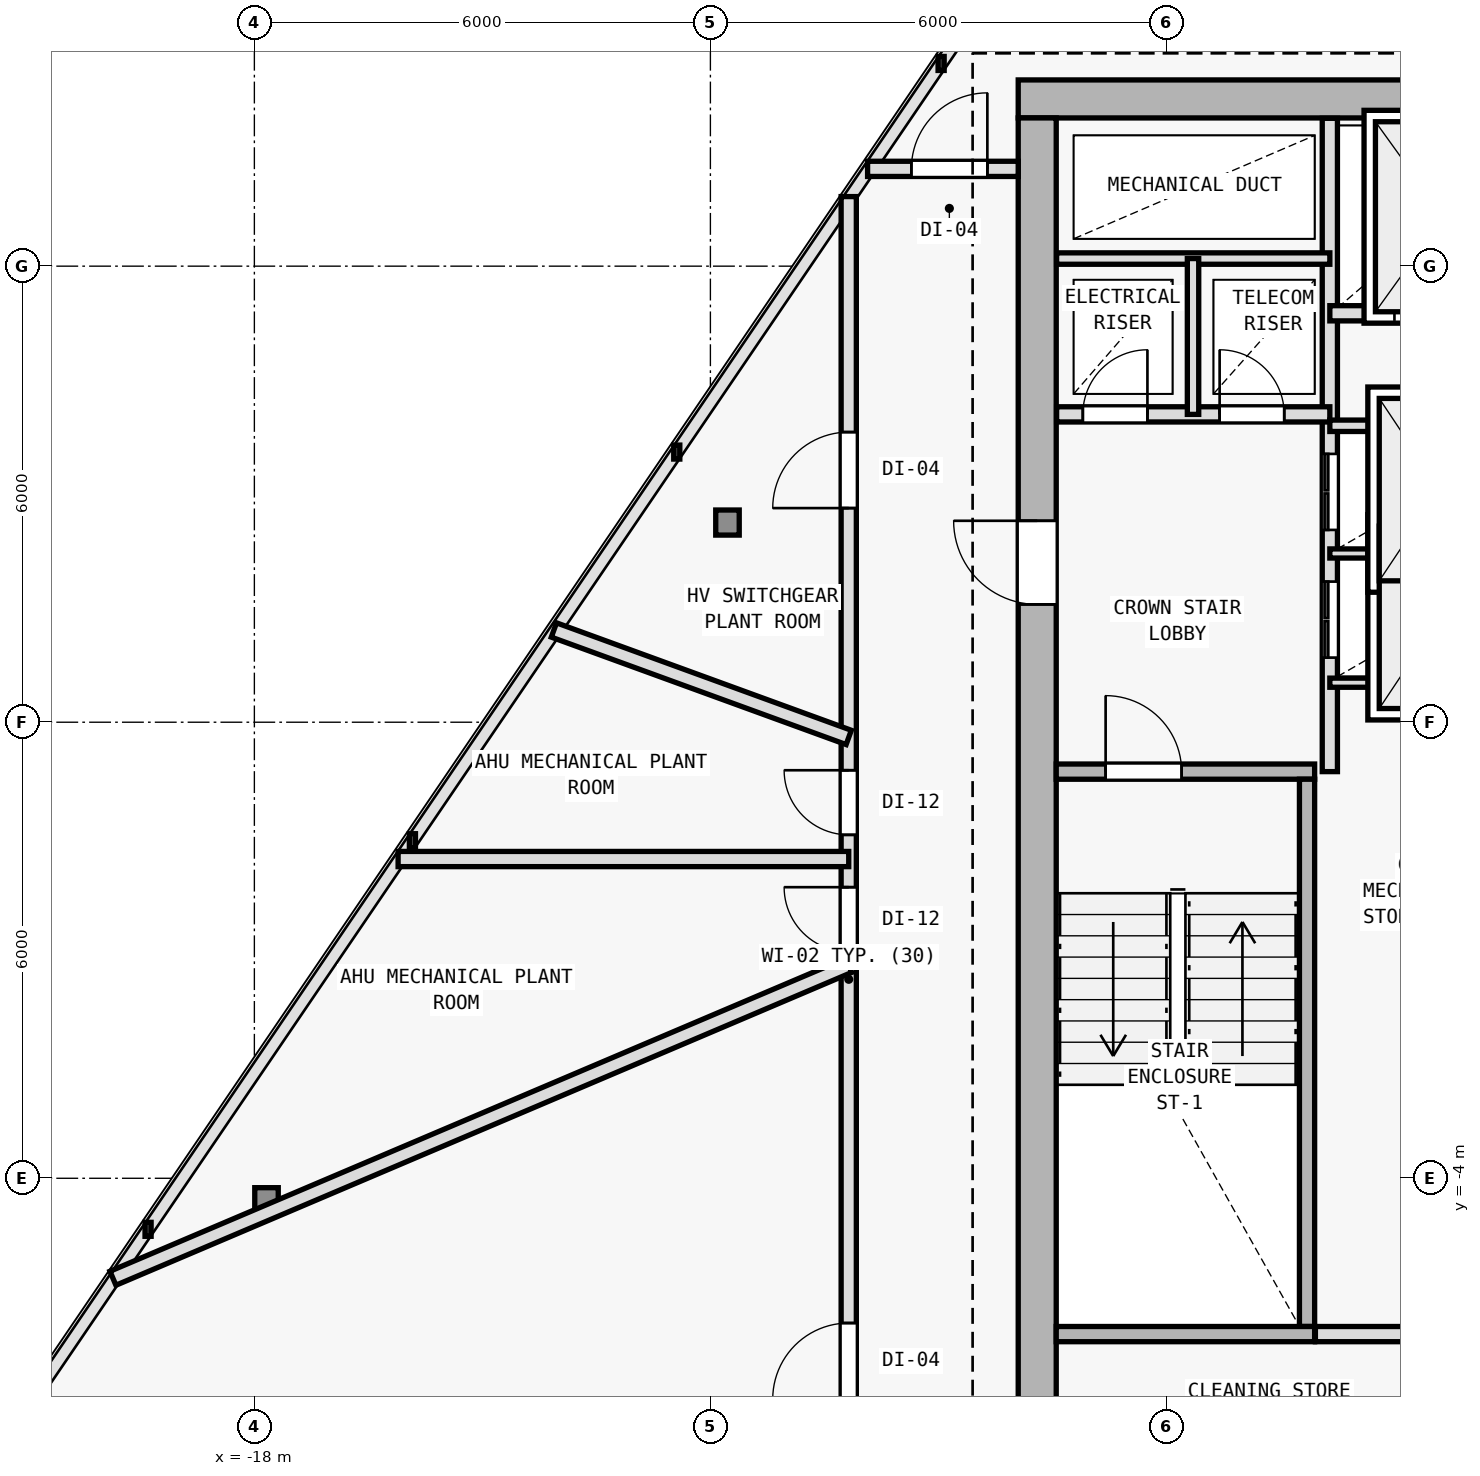
"""IFC4 building model, lengths in metres.
Left out: names, types, materials, properties, quantities, classifications, styles, units other than length and angle.
Written with IfcOpenShell. Run it as: python <this file> out.ifc"""

import sys

from ifc_helpers import new_model, si_unit, direction, frame, frame_2d, origin, origin_2d, place, context, subcontext, project, spatial, rectangle, i_section, extrude, element, fill, save


model = new_model("IFC4")
c1 = context("Model", 3, precision=1e-05, world=origin(), true_north=direction((0.0, 1.0)))
c2 = subcontext(c1, "Body", "Model", "MODEL_VIEW")
j1 = project(units=[si_unit("LENGTHUNIT", "METRE"), si_unit("PLANEANGLEUNIT", "RADIAN")], contexts=[c1])
p1 = place(None, origin())
s1 = spatial("IfcSite", under=j1, at=p1, CompositionType="ELEMENT")
p2 = place(p1, origin())
s2 = spatial("IfcBuilding", under=s1, at=p2, CompositionType="ELEMENT")
p3 = place(p2, frame((0.0, 0.0, 308.4)))
s3 = spatial("IfcBuildingStorey", under=s2, at=p3, CompositionType="ELEMENT", Elevation=308.4)
for number, where, z_axis, x_axis in (
    (1, (-7.7, 10.2, 0.0), (0.0, 0.0, 1.0), (1.0, 0.0, 0.0)),
    (2, (-7.7, 2.0, 0.0), (0.0, 0.0, 1.0), (1.0, 0.0, 0.0)),
):
    element("IfcColumn", number, at=place(p3, frame(where, z_axis=z_axis, x_axis=x_axis)), inside=s3, PredefinedType="COLUMN", context=c2, shape_type="SweptSolid", body=[
        extrude(i_section(OverallWidth=0.374, OverallDepth=0.372, WebThickness=0.012, FlangeThickness=0.02, FilletRadius=0.015, at=origin_2d()), origin(), (0.0, 0.0, 1.0), 3.6),
    ])
for number, where, z_axis, x_axis in (
    (3, (-17.84, -4.289, 0.0), (0.0, 0.0, 1.0), (1.0, 0.0, 0.0)),
    (4, (-11.775, 4.627, 0.0), (0.0, 0.0, 1.0), (1.0, 0.0, 0.0)),
):
    element("IfcColumn", number, at=place(p3, frame(where, z_axis=z_axis, x_axis=x_axis)), inside=s3, PredefinedType="COLUMN", context=c2, shape_type="SweptSolid", body=[
        extrude(i_section(OverallWidth=0.309, OverallDepth=0.33, WebThickness=0.011, FlangeThickness=0.019, FilletRadius=0.027, at=origin_2d()), origin(), (0.0, 0.0, 1.0), 3.6),
    ])
p4 = place(p3, frame((7.95, 10.2, 0.0), z_axis=(0.0, 0.0, 1.0), x_axis=(-1.0, 0.0, 0.0)))
e5 = element("IfcWall", 5, at=p4, inside=s3, PredefinedType="SHEAR", context=c2, shape_type="SweptSolid", body=[
    extrude(rectangle(XDim=15.9, YDim=0.5, at=frame_2d((7.95, 0.0))), origin(), (0.0, 0.0, 1.0), 3.34),
])
p5 = place(p4, frame((4.4, 0.0, 0.0)))
e6 = element("IfcOpeningElement", 6, at=p5, cuts=e5, PredefinedType="OPENING", context=c2, shape_type="SweptSolid", body=[
    extrude(rectangle(XDim=1.1, YDim=2.15, at=frame_2d((0.55, 1.075))), frame((0.0, 0.26, 0.0), z_axis=(0.0, -1.0, 0.0), x_axis=(1.0, 0.0, 0.0)), (0.0, 0.0, 1.0), 0.52),
])
p6 = place(p3, frame((-7.7, -9.15, 0.0), z_axis=(0.0, 0.0, 1.0), x_axis=(0.0, 1.0, 0.0)))
e7 = element("IfcWall", 7, at=p6, inside=s3, PredefinedType="SHEAR", context=c2, shape_type="SweptSolid", body=[
    extrude(rectangle(XDim=19.1, YDim=0.5, at=frame_2d((9.55, 0.0))), origin(), (0.0, 0.0, 1.0), 3.34),
])
p7 = place(p6, frame((12.7, 0.0, 0.0)))
e8 = element("IfcOpeningElement", 8, at=p7, cuts=e7, PredefinedType="OPENING", context=c2, shape_type="SweptSolid", body=[
    extrude(rectangle(XDim=1.1, YDim=2.15, at=frame_2d((0.55, 1.075))), frame((0.0, 0.26, 0.0), z_axis=(0.0, -1.0, 0.0), x_axis=(1.0, 0.0, 0.0)), (0.0, 0.0, 1.0), 0.52),
])
p8 = place(p3, frame((-7.45, 1.35, 0.0), z_axis=(0.0, 0.0, 1.0), x_axis=(1.0, 0.0, 0.0)))
e9 = element("IfcWall", 9, at=p8, inside=s3, PredefinedType="SOLIDWALL", context=c2, shape_type="SweptSolid", body=[
    extrude(rectangle(XDim=3.4, YDim=0.2, at=frame_2d((1.7, 0.0))), origin(), (0.0, 0.0, 1.0), 3.34),
])
p9 = place(p8, frame((0.65, 0.0, 0.0)))
e10 = element("IfcOpeningElement", 10, at=p9, cuts=e9, PredefinedType="OPENING", context=c2, shape_type="SweptSolid", body=[
    extrude(rectangle(XDim=1.0, YDim=2.15, at=frame_2d((0.5, 1.075))), frame((0.0, 0.11, 0.0), z_axis=(0.0, -1.0, 0.0), x_axis=(1.0, 0.0, 0.0)), (0.0, 0.0, 1.0), 0.22),
])
p10 = place(p3, frame((-4.15, -5.95, 0.0), z_axis=(0.0, 0.0, 1.0), x_axis=(0.0, 1.0, 0.0)))
e11 = element("IfcWall", 11, at=p10, inside=s3, PredefinedType="SOLIDWALL", context=c2, shape_type="SweptSolid", body=[
    extrude(rectangle(XDim=7.2, YDim=0.2, at=frame_2d((3.6, 0.0))), origin(), (0.0, 0.0, 1.0), 3.34),
])
p11 = place(p3, frame((-3.85, 1.35, 0.0), z_axis=(0.0, 0.0, 1.0), x_axis=(0.0, 1.0, 0.0)))
e12 = element("IfcWall", 12, at=p11, inside=s3, PredefinedType="SOLIDWALL", context=c2, shape_type="SweptSolid", body=[
    extrude(rectangle(XDim=8.595, YDim=0.2, at=frame_2d((4.297, 0.0))), origin(), (0.0, 0.0, 1.0), 3.34),
])
p12 = place(p11, frame((1.5, 0.0, 0.0)))
e13 = element("IfcOpeningElement", 13, at=p12, cuts=e12, PredefinedType="OPENING", context=c2, shape_type="SweptSolid", body=[
    extrude(rectangle(XDim=1.0, YDim=2.15, at=frame_2d((0.5, 1.075))), frame((0.0, 0.11, 0.0), z_axis=(0.0, -1.0, 0.0), x_axis=(1.0, 0.0, 0.0)), (0.0, 0.0, 1.0), 0.22),
])
p13 = place(p11, frame((3.18, 0.0, 0.0)))
e14 = element("IfcOpeningElement", 14, at=p13, cuts=e12, PredefinedType="OPENING", context=c2, shape_type="SweptSolid", body=[
    extrude(rectangle(XDim=1.0, YDim=2.15, at=frame_2d((0.5, 1.075))), frame((0.0, 0.11, 0.0), z_axis=(0.0, -1.0, 0.0), x_axis=(1.0, 0.0, 0.0)), (0.0, 0.0, 1.0), 0.22),
])
p14 = place(p3, frame((-7.445, 6.05, 0.0), z_axis=(0.0, 0.0, 1.0), x_axis=(1.0, 0.0, 0.0)))
e15 = element("IfcWall", 15, at=p14, inside=s3, PredefinedType="SOLIDWALL", context=c2, shape_type="SweptSolid", body=[
    extrude(rectangle(XDim=3.595, YDim=0.2, at=frame_2d((1.797, 0.0))), origin(), (0.0, 0.0, 1.0), 3.34),
])
p15 = place(p14, frame((0.345, 0.0, 0.0)))
e16 = element("IfcOpeningElement", 16, at=p15, cuts=e15, PredefinedType="OPENING", context=c2, shape_type="SweptSolid", body=[
    extrude(rectangle(XDim=0.85, YDim=2.1, at=frame_2d((0.425, 1.05))), frame((0.0, 0.11, 0.0), z_axis=(0.0, -1.0, 0.0), x_axis=(1.0, 0.0, 0.0)), (0.0, 0.0, 1.0), 0.22),
])
p16 = place(p14, frame((2.145, 0.0, 0.0)))
e17 = element("IfcOpeningElement", 17, at=p16, cuts=e15, PredefinedType="OPENING", context=c2, shape_type="SweptSolid", body=[
    extrude(rectangle(XDim=0.85, YDim=2.1, at=frame_2d((0.425, 1.05))), frame((0.0, 0.11, 0.0), z_axis=(0.0, -1.0, 0.0), x_axis=(1.0, 0.0, 0.0)), (0.0, 0.0, 1.0), 0.22),
])
p17 = place(p3, frame((-7.445, 8.1, 0.0), z_axis=(0.0, 0.0, 1.0), x_axis=(1.0, 0.0, 0.0)))
e18 = element("IfcWall", 18, at=p17, inside=s3, PredefinedType="PARTITIONING", context=c2, shape_type="SweptSolid", body=[
    extrude(rectangle(XDim=3.595, YDim=0.15, at=frame_2d((1.797, 0.0))), origin(), (0.0, 0.0, 1.0), 3.34),
])
p18 = place(p3, frame((-5.65, 6.05, 0.0), z_axis=(0.0, 0.0, 1.0), x_axis=(0.0, 1.0, 0.0)))
e19 = element("IfcWall", 19, at=p18, inside=s3, PredefinedType="PARTITIONING", context=c2, shape_type="SweptSolid", body=[
    extrude(rectangle(XDim=2.05, YDim=0.15, at=frame_2d((1.025, 0.0))), origin(), (0.0, 0.0, 1.0), 3.34),
])
for number, where, z_axis, x_axis in (
    (20, (-3.85, 2.52, 0.0), (0.0, 0.0, 1.0), (1.0, 0.0, 0.0)),
    (21, (-3.85, 4.22, 0.0), (0.0, 0.0, 1.0), (1.0, 0.0, 0.0)),
):
    element("IfcWall", number, at=place(p3, frame(where, z_axis=z_axis, x_axis=x_axis)), inside=s3, PredefinedType="PARTITIONING", context=c2, shape_type="SweptSolid", body=[
        extrude(rectangle(XDim=2.9, YDim=0.12, at=frame_2d((1.45, 0.0))), origin(), (0.0, 0.0, 1.0), 3.34),
    ])
p19 = place(p3, frame((-3.85, 5.9, 0.0), z_axis=(0.0, 0.0, 1.0), x_axis=(1.0, 0.0, 0.0)))
e22 = element("IfcWall", 22, at=p19, inside=s3, PredefinedType="PARTITIONING", context=c2, shape_type="SweptSolid", body=[
    extrude(rectangle(XDim=2.9, YDim=0.15, at=frame_2d((1.45, 0.0))), origin(), (0.0, 0.0, 1.0), 3.34),
])
p20 = place(p3, frame((-3.85, 7.38, 0.0), z_axis=(0.0, 0.0, 1.0), x_axis=(1.0, 0.0, 0.0)))
e23 = element("IfcWall", 23, at=p20, inside=s3, PredefinedType="SOLIDWALL", context=c2, shape_type="SweptSolid", body=[
    extrude(rectangle(XDim=2.9, YDim=0.2, at=frame_2d((1.45, 0.0))), origin(), (0.0, 0.0, 1.0), 3.34),
])
p21 = place(p20, frame((0.85, 0.0, 0.0)))
e24 = element("IfcOpeningElement", 24, at=p21, cuts=e23, PredefinedType="OPENING", context=c2, shape_type="SweptSolid", body=[
    extrude(rectangle(XDim=1.2, YDim=2.2, at=frame_2d((0.6, 1.1))), frame((0.0, 0.11, 0.0), z_axis=(0.0, -1.0, 0.0), x_axis=(1.0, 0.0, 0.0)), (0.0, 0.0, 1.0), 0.22),
])
p22 = place(p3, frame((-7.45, -6.05, 0.0), z_axis=(0.0, 0.0, 1.0), x_axis=(1.0, 0.0, 0.0)))
e25 = element("IfcWall", 25, at=p22, inside=s3, PredefinedType="SOLIDWALL", context=c2, shape_type="SweptSolid", body=[
    extrude(rectangle(XDim=3.4, YDim=0.2, at=frame_2d((1.7, 0.0))), origin(), (0.0, 0.0, 1.0), 3.34),
])
p23 = place(p3, frame((-4.04, -6.05, 0.0), z_axis=(0.0, 0.0, 1.0), x_axis=(1.0, 0.0, 0.0)))
e26 = element("IfcWall", 26, at=p23, inside=s3, PredefinedType="SOLIDWALL", context=c2, shape_type="SweptSolid", body=[
    extrude(rectangle(XDim=2.79, YDim=0.2, at=frame_2d((1.395, 0.0))), origin(), (0.0, 0.0, 1.0), 3.34),
])
p24 = place(p3, frame((-10.18, -11.68, 0.0), z_axis=(0.0, 0.0, 1.0), x_axis=(0.0, 1.0, 0.0)))
e27 = element("IfcWall", 27, at=p24, inside=s3, PredefinedType="SOLIDWALL", context=c2, shape_type="SweptSolid", body=[
    extrude(rectangle(XDim=20.595, YDim=0.2, at=frame_2d((10.298, 0.0))), origin(), (0.0, 0.0, 1.0), 2.995),
])
p25 = place(p24, frame((10.66, 0.0, 0.0)))
e28 = element("IfcOpeningElement", 28, at=p25, cuts=e27, PredefinedType="OPENING", context=c2, shape_type="SweptSolid", body=[
    extrude(rectangle(XDim=0.85, YDim=2.1, at=frame_2d((0.425, 1.05))), frame((0.0, 0.11, 0.0), z_axis=(0.0, -1.0, 0.0), x_axis=(1.0, 0.0, 0.0)), (0.0, 0.0, 1.0), 0.22),
])
p26 = place(p24, frame((4.776, 0.0, 0.0)))
e29 = element("IfcOpeningElement", 29, at=p26, cuts=e27, PredefinedType="OPENING", context=c2, shape_type="SweptSolid", body=[
    extrude(rectangle(XDim=1.0, YDim=2.15, at=frame_2d((0.5, 1.075))), frame((0.0, 0.11, 0.0), z_axis=(0.0, -1.0, 0.0), x_axis=(1.0, 0.0, 0.0)), (0.0, 0.0, 1.0), 0.22),
])
p27 = place(p24, frame((16.497, 0.0, 0.0)))
e30 = element("IfcOpeningElement", 30, at=p27, cuts=e27, PredefinedType="OPENING", context=c2, shape_type="SweptSolid", body=[
    extrude(rectangle(XDim=1.0, YDim=2.15, at=frame_2d((0.5, 1.075))), frame((0.0, 0.11, 0.0), z_axis=(0.0, -1.0, 0.0), x_axis=(1.0, 0.0, 0.0)), (0.0, 0.0, 1.0), 0.22),
])
p28 = place(p24, frame((12.198, 0.0, 0.0)))
e31 = element("IfcOpeningElement", 31, at=p28, cuts=e27, PredefinedType="OPENING", context=c2, shape_type="SweptSolid", body=[
    extrude(rectangle(XDim=0.85, YDim=2.1, at=frame_2d((0.425, 1.05))), frame((0.0, 0.11, 0.0), z_axis=(0.0, -1.0, 0.0), x_axis=(1.0, 0.0, 0.0)), (0.0, 0.0, 1.0), 0.22),
])
p29 = place(p3, frame((-9.932, 9.28, 0.0), z_axis=(0.0, 0.0, 1.0), x_axis=(1.0, 0.0, 0.0)))
e32 = element("IfcWall", 32, at=p29, inside=s3, PredefinedType="SOLIDWALL", context=c2, shape_type="SweptSolid", body=[
    extrude(rectangle(XDim=1.982, YDim=0.2, at=frame_2d((0.991, 0.0))), origin(), (0.0, 0.0, 1.0), 3.34),
])
p30 = place(p29, frame((0.576, 0.0, 0.0)))
e33 = element("IfcOpeningElement", 33, at=p30, cuts=e32, PredefinedType="OPENING", context=c2, shape_type="SweptSolid", body=[
    extrude(rectangle(XDim=1.0, YDim=2.15, at=frame_2d((0.5, 1.075))), frame((0.0, 0.11, 0.0), z_axis=(0.0, -1.0, 0.0), x_axis=(1.0, 0.0, 0.0)), (0.0, 0.0, 1.0), 0.22),
])
p31 = place(p3, frame((-19.861, -5.315, 0.0), z_axis=(0.0, 0.0, 1.0), x_axis=(0.920301883317, 0.391208951282, 0.0)))
e34 = element("IfcWall", 34, at=p31, inside=s3, PredefinedType="SOLIDWALL", context=c2, shape_type="SweptSolid", body=[
    extrude(rectangle(XDim=10.519, YDim=0.2, at=frame_2d((5.26, 0.0))), origin(), (0.0, 0.0, 1.0), 2.995),
])
p32 = place(p3, frame((-14.059, 3.213, 0.0), z_axis=(0.0, 0.0, 1.0), x_axis=(0.939573947061, -0.342346020867, 0.0)))
e35 = element("IfcWall", 35, at=p32, inside=s3, PredefinedType="SOLIDWALL", context=c2, shape_type="SweptSolid", body=[
    extrude(rectangle(XDim=4.128, YDim=0.2, at=frame_2d((2.064, 0.0))), origin(), (0.0, 0.0, 1.0), 3.34),
])
p33 = place(p3, frame((-16.109, 0.2, 0.0), z_axis=(0.0, 0.0, 1.0), x_axis=(1.0, 0.0, 0.0)))
e36 = element("IfcWall", 36, at=p33, inside=s3, PredefinedType="SOLIDWALL", context=c2, shape_type="SweptSolid", body=[
    extrude(rectangle(XDim=5.929, YDim=0.2, at=frame_2d((2.964, 0.0))), origin(), (0.0, 0.0, 1.0), 3.34),
])
p34 = place(p7, origin())
e37 = element("IfcDoor", 37, at=p34, inside=s3, OperationType="SINGLE_SWING_RIGHT", PredefinedType="DOOR", context=c2, shape_type="SweptSolid", body=[
    extrude(rectangle(XDim=1.1, YDim=2.15, at=frame_2d((0.55, 1.075))), frame((0.0, 0.025, 0.0), z_axis=(0.0, -1.0, 0.0), x_axis=(1.0, 0.0, 0.0)), (0.0, 0.0, 1.0), 0.05),
])
fill(e8, e37)
p35 = place(p9, origin())
e38 = element("IfcDoor", 38, at=p35, inside=s3, OperationType="SINGLE_SWING_LEFT", PredefinedType="DOOR", context=c2, shape_type="SweptSolid", body=[
    extrude(rectangle(XDim=1.0, YDim=2.15, at=frame_2d((0.5, 1.075))), frame((0.0, 0.025, 0.0), z_axis=(0.0, -1.0, 0.0), x_axis=(1.0, 0.0, 0.0)), (0.0, 0.0, 1.0), 0.05),
])
fill(e10, e38)
p36 = place(p15, origin())
e39 = element("IfcDoor", 39, at=p36, inside=s3, OperationType="SINGLE_SWING_RIGHT", PredefinedType="DOOR", context=c2, shape_type="SweptSolid", body=[
    extrude(rectangle(XDim=0.85, YDim=2.1, at=frame_2d((0.425, 1.05))), frame((0.0, 0.025, 0.0), z_axis=(0.0, -1.0, 0.0), x_axis=(1.0, 0.0, 0.0)), (0.0, 0.0, 1.0), 0.05),
])
fill(e16, e39)
p37 = place(p16, origin())
e40 = element("IfcDoor", 40, at=p37, inside=s3, OperationType="SINGLE_SWING_LEFT", PredefinedType="DOOR", context=c2, shape_type="SweptSolid", body=[
    extrude(rectangle(XDim=0.85, YDim=2.1, at=frame_2d((0.425, 1.05))), frame((0.0, 0.025, 0.0), z_axis=(0.0, -1.0, 0.0), x_axis=(1.0, 0.0, 0.0)), (0.0, 0.0, 1.0), 0.05),
])
fill(e17, e40)
p38 = place(p21, origin())
e41 = element("IfcDoor", 41, at=p38, inside=s3, OperationType="DOUBLE_DOOR_SLIDING", PredefinedType="DOOR", context=c2, shape_type="SweptSolid", body=[
    extrude(rectangle(XDim=1.2, YDim=2.2, at=frame_2d((0.6, 1.1))), frame((0.0, 0.025, 0.0), z_axis=(0.0, -1.0, 0.0), x_axis=(1.0, 0.0, 0.0)), (0.0, 0.0, 1.0), 0.05),
])
fill(e24, e41)
p39 = place(p12, origin())
e42 = element("IfcDoor", 42, at=p39, inside=s3, OperationType="DOUBLE_DOOR_SLIDING", PredefinedType="DOOR", context=c2, shape_type="SweptSolid", body=[
    extrude(rectangle(XDim=1.0, YDim=2.15, at=frame_2d((0.5, 1.075))), frame((0.0, 0.025, 0.0), z_axis=(0.0, -1.0, 0.0), x_axis=(1.0, 0.0, 0.0)), (0.0, 0.0, 1.0), 0.05),
])
fill(e13, e42)
p40 = place(p13, origin())
e43 = element("IfcDoor", 43, at=p40, inside=s3, OperationType="DOUBLE_DOOR_SLIDING", PredefinedType="DOOR", context=c2, shape_type="SweptSolid", body=[
    extrude(rectangle(XDim=1.0, YDim=2.15, at=frame_2d((0.5, 1.075))), frame((0.0, 0.025, 0.0), z_axis=(0.0, -1.0, 0.0), x_axis=(1.0, 0.0, 0.0)), (0.0, 0.0, 1.0), 0.05),
])
fill(e14, e43)
p41 = place(p25, origin())
e44 = element("IfcDoor", 44, at=p41, inside=s3, OperationType="SINGLE_SWING_RIGHT", PredefinedType="DOOR", context=c2, shape_type="SweptSolid", body=[
    extrude(rectangle(XDim=0.85, YDim=2.1, at=frame_2d((0.425, 1.05))), frame((0.0, 0.025, 0.0), z_axis=(0.0, -1.0, 0.0), x_axis=(1.0, 0.0, 0.0)), (0.0, 0.0, 1.0), 0.05),
])
fill(e28, e44)
p42 = place(p26, origin())
e45 = element("IfcDoor", 45, at=p42, inside=s3, OperationType="SINGLE_SWING_LEFT", PredefinedType="DOOR", context=c2, shape_type="SweptSolid", body=[
    extrude(rectangle(XDim=1.0, YDim=2.15, at=frame_2d((0.5, 1.075))), frame((0.0, 0.025, 0.0), z_axis=(0.0, -1.0, 0.0), x_axis=(1.0, 0.0, 0.0)), (0.0, 0.0, 1.0), 0.05),
])
fill(e29, e45)
p43 = place(p30, origin())
e46 = element("IfcDoor", 46, at=p43, inside=s3, OperationType="SINGLE_SWING_RIGHT", PredefinedType="DOOR", context=c2, shape_type="SweptSolid", body=[
    extrude(rectangle(XDim=1.0, YDim=2.15, at=frame_2d((0.5, 1.075))), frame((0.0, 0.025, 0.0), z_axis=(0.0, -1.0, 0.0), x_axis=(1.0, 0.0, 0.0)), (0.0, 0.0, 1.0), 0.05),
])
fill(e33, e46)
p44 = place(p27, origin())
e47 = element("IfcDoor", 47, at=p44, inside=s3, OperationType="SINGLE_SWING_LEFT", PredefinedType="DOOR", context=c2, shape_type="SweptSolid", body=[
    extrude(rectangle(XDim=1.0, YDim=2.15, at=frame_2d((0.5, 1.075))), frame((0.0, 0.025, 0.0), z_axis=(0.0, -1.0, 0.0), x_axis=(1.0, 0.0, 0.0)), (0.0, 0.0, 1.0), 0.05),
])
fill(e30, e47)
p45 = place(p28, origin())
e48 = element("IfcDoor", 48, at=p45, inside=s3, OperationType="SINGLE_SWING_RIGHT", PredefinedType="DOOR", context=c2, shape_type="SweptSolid", body=[
    extrude(rectangle(XDim=0.85, YDim=2.1, at=frame_2d((0.425, 1.05))), frame((0.0, 0.025, 0.0), z_axis=(0.0, -1.0, 0.0), x_axis=(1.0, 0.0, 0.0)), (0.0, 0.0, 1.0), 0.05),
])
fill(e31, e48)
save(model, sys.argv[1])
